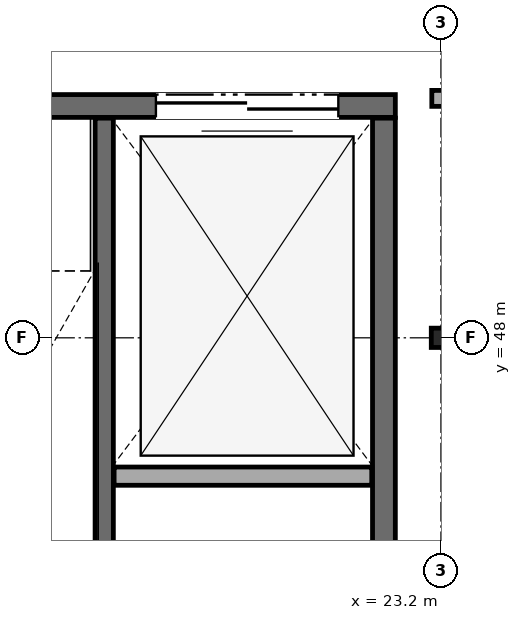
"""IFC4 building model, lengths in metres.
Left out: names, types, materials, properties, quantities, classifications, styles, units other than length and angle.
Written with IfcOpenShell. Run it as: python <this file> out.ifc"""

import sys

from ifc_helpers import new_model, si_unit, direction, frame, frame_2d, origin, origin_2d, place, context, subcontext, project, spatial, rectangle, i_section, extrude, element, fill, save


model = new_model("IFC4")
c1 = context("Model", 3, precision=1e-05, world=origin(), true_north=direction((0.0, 1.0)))
c2 = subcontext(c1, "Body", "Model", "MODEL_VIEW")
j1 = project(units=[si_unit("LENGTHUNIT", "METRE"), si_unit("PLANEANGLEUNIT", "RADIAN")], contexts=[c1])
p1 = place(None, origin())
s1 = spatial("IfcSite", under=j1, at=p1, CompositionType="ELEMENT")
p2 = place(p1, origin())
s2 = spatial("IfcBuilding", under=s1, at=p2, CompositionType="ELEMENT")
p3 = place(p2, frame((0.0, 0.0, 14.6)))
s3 = spatial("IfcBuildingStorey", under=s2, at=p3, CompositionType="ELEMENT", Elevation=14.6)
p4 = place(p3, frame((23.2, 48.0, 0.0), z_axis=(0.0, 0.0, 1.0), x_axis=(1.0, 0.0, 0.0)))
e1 = element("IfcColumn", 1, at=p4, inside=s3, PredefinedType="COLUMN", context=c2, shape_type="SweptSolid", body=[
    extrude(i_section(OverallWidth=0.254, OverallDepth=0.254, WebThickness=0.009, FlangeThickness=0.014, FilletRadius=0.013, at=origin_2d()), origin(), (0.0, 0.0, 1.0), 4.5),
])
p5 = place(p3, frame((22.6, 51.05, 0.0), z_axis=(0.0, 0.0, 1.0), x_axis=(-1.0, 0.0, 0.0)))
e2 = element("IfcWall", 2, at=p5, inside=s3, PredefinedType="SHEAR", context=c2, shape_type="SweptSolid", body=[
    extrude(rectangle(XDim=8.4, YDim=0.3, at=frame_2d((4.2, 0.0))), origin(), (0.0, 0.0, 1.0), 4.245),
])
p6 = place(p5, frame((5.435, 0.0, 0.0)))
e3 = element("IfcOpeningElement", 3, at=p6, cuts=e2, PredefinedType="OPENING", context=c2, shape_type="SweptSolid", body=[
    extrude(rectangle(XDim=1.25, YDim=2.2, at=frame_2d((0.625, 1.1))), frame((0.0, 0.16, 0.0), z_axis=(0.0, -1.0, 0.0), x_axis=(1.0, 0.0, 0.0)), (0.0, 0.0, 1.0), 0.32),
])
p7 = place(p5, frame((0.75, 0.0, 0.0)))
e4 = element("IfcOpeningElement", 4, at=p7, cuts=e2, PredefinedType="OPENING", context=c2, shape_type="SweptSolid", body=[
    extrude(rectangle(XDim=2.4, YDim=2.55, at=frame_2d((1.2, 1.275))), frame((0.0, 0.16, 0.0), z_axis=(0.0, -1.0, 0.0), x_axis=(1.0, 0.0, 0.0)), (0.0, 0.0, 1.0), 0.32),
])
p8 = place(p3, frame((22.45, 41.51, 0.0), z_axis=(0.0, 0.0, 1.0), x_axis=(0.0, 1.0, 0.0)))
e5 = element("IfcWall", 5, at=p8, inside=s3, PredefinedType="SHEAR", context=c2, shape_type="SweptSolid", body=[
    extrude(rectangle(XDim=9.38, YDim=0.3, at=frame_2d((4.69, 0.0))), origin(), (0.0, 0.0, 1.0), 4.245),
])
p9 = place(p3, frame((18.77, 41.51, 0.0), z_axis=(0.0, 0.0, 1.0), x_axis=(0.0, 1.0, 0.0)))
e6 = element("IfcWall", 6, at=p9, inside=s3, PredefinedType="SOLIDWALL", context=c2, shape_type="SweptSolid", body=[
    extrude(rectangle(XDim=9.38, YDim=0.24, at=frame_2d((4.69, 0.0))), origin(), (0.0, 0.0, 1.0), 4.245),
])
p10 = place(p3, frame((18.9, 46.18, 0.0), z_axis=(0.0, 0.0, 1.0), x_axis=(1.0, 0.0, 0.0)))
e7 = element("IfcWall", 7, at=p10, inside=s3, PredefinedType="SOLIDWALL", context=c2, shape_type="SweptSolid", body=[
    extrude(rectangle(XDim=3.39, YDim=0.24, at=frame_2d((1.695, 0.0))), origin(), (0.0, 0.0, 1.0), 4.245),
])
p11 = place(p3, frame((23.08, 51.15, 0.0), z_axis=(0.0, 0.0, 1.0), x_axis=(1.0, 0.0, 0.0)))
e8 = element("IfcWall", 8, at=p11, inside=s3, PredefinedType="PARTITIONING", context=c2, shape_type="SweptSolid", body=[
    extrude(rectangle(XDim=3.04, YDim=0.21, at=frame_2d((1.52, 0.0))), origin(), (0.0, 0.0, 1.0), 3.763),
])
p12 = place(p7, origin())
e9 = element("IfcDoor", 9, at=p12, inside=s3, OperationType="DOUBLE_DOOR_SLIDING", PredefinedType="DOOR", context=c2, shape_type="SweptSolid", body=[
    extrude(rectangle(XDim=2.4, YDim=2.55, at=frame_2d((1.2, 1.275))), frame((0.0, 0.025, 0.0), z_axis=(0.0, -1.0, 0.0), x_axis=(1.0, 0.0, 0.0)), (0.0, 0.0, 1.0), 0.05),
])
fill(e4, e9)
save(model, sys.argv[1])
